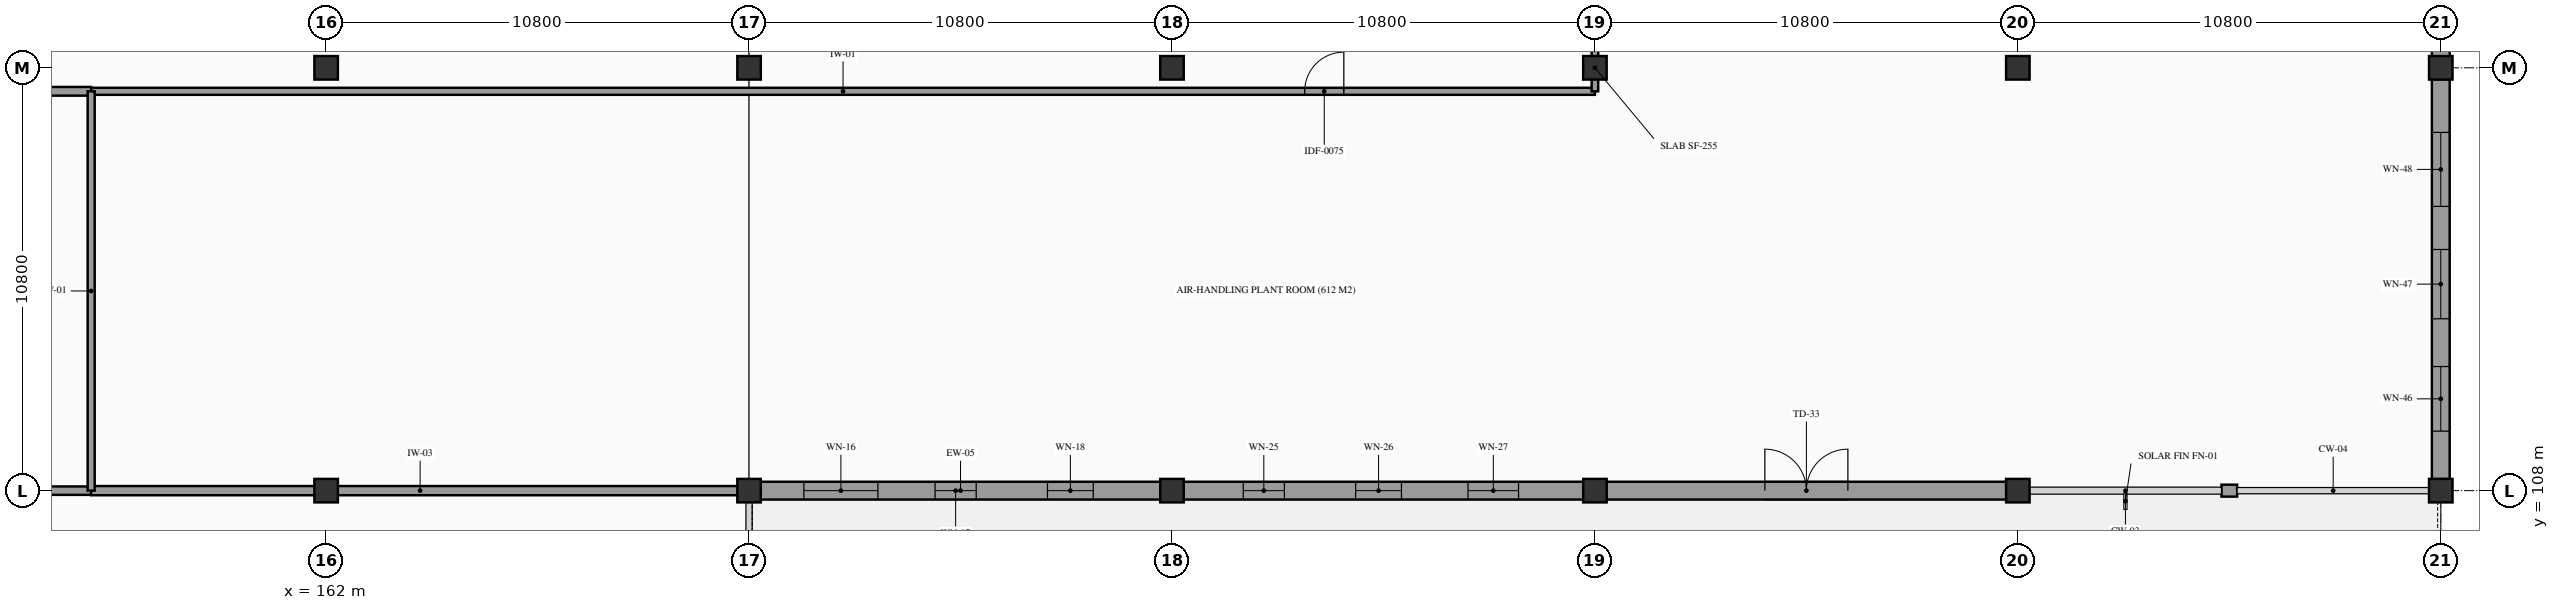
"""IFC4 building model, lengths in metres.
Left out: names, types, materials, properties, quantities, classifications, styles, units other than length and angle.
Written with IfcOpenShell. Run it as: python <this file> out.ifc"""

import sys

from ifc_helpers import new_model, si_unit, direction, frame, frame_2d, origin, origin_2d, place, context, subcontext, project, spatial, rectangle, extrude, element, fill, save


model = new_model("IFC4")
c1 = context("Model", 3, precision=1e-05, world=origin(), true_north=direction((0.0, 1.0)))
c2 = subcontext(c1, "Body", "Model", "MODEL_VIEW")
j1 = project(units=[si_unit("LENGTHUNIT", "METRE"), si_unit("PLANEANGLEUNIT", "RADIAN")], contexts=[c1])
p1 = place(None, origin())
s1 = spatial("IfcSite", under=j1, at=p1, CompositionType="ELEMENT")
p2 = place(p1, origin())
s2 = spatial("IfcBuilding", under=s1, at=p2, CompositionType="ELEMENT")
p3 = place(p2, frame((0.0, 0.0, 5.4)))
s3 = spatial("IfcBuildingStorey", under=s2, at=p3, CompositionType="ELEMENT", Elevation=5.4)
for number, where, z_axis, x_axis in (
    (1, (162.0, 108.0, 0.0), (0.0, 0.0, 1.0), (1.0, 0.0, 0.0)),
    (2, (162.0, 118.8, 0.0), (0.0, 0.0, 1.0), (1.0, 0.0, 0.0)),
    (3, (172.8, 108.0, 0.0), (0.0, 0.0, 1.0), (1.0, 0.0, 0.0)),
    (4, (172.8, 118.8, 0.0), (0.0, 0.0, 1.0), (1.0, 0.0, 0.0)),
    (5, (183.6, 108.0, 0.0), (0.0, 0.0, 1.0), (1.0, 0.0, 0.0)),
    (6, (183.6, 118.8, 0.0), (0.0, 0.0, 1.0), (1.0, 0.0, 0.0)),
    (7, (194.4, 108.0, 0.0), (0.0, 0.0, 1.0), (1.0, 0.0, 0.0)),
    (8, (194.4, 118.8, 0.0), (0.0, 0.0, 1.0), (1.0, 0.0, 0.0)),
    (9, (205.2, 108.0, 0.0), (0.0, 0.0, 1.0), (1.0, 0.0, 0.0)),
    (10, (205.2, 118.8, 0.0), (0.0, 0.0, 1.0), (1.0, 0.0, 0.0)),
    (11, (216.0, 108.0, 0.0), (0.0, 0.0, 1.0), (1.0, 0.0, 0.0)),
    (12, (216.0, 118.8, 0.0), (0.0, 0.0, 1.0), (1.0, 0.0, 0.0)),
):
    element("IfcColumn", number, at=place(p3, frame(where, z_axis=z_axis, x_axis=x_axis)), inside=s3, PredefinedType="COLUMN", context=c2, shape_type="SweptSolid", body=[
        extrude(rectangle(XDim=0.6, YDim=0.6, at=origin_2d()), origin(), (0.0, 0.0, 1.0), 4.68),
    ])
p4 = place(p3, frame((173.095, 108.0, 0.0), z_axis=(0.0, 0.0, 1.0), x_axis=(1.0, 0.0, 0.0)))
e13 = element("IfcWall", 13, at=p4, inside=s3, PredefinedType="STANDARD", context=c2, shape_type="SweptSolid", body=[
    extrude(rectangle(XDim=10.21, YDim=0.455, at=frame_2d((5.105, 0.0))), origin(), (0.0, 0.0, 1.0), 3.53),
])
p5 = place(p4, frame((1.105, 0.0, 0.95)))
e14 = element("IfcOpeningElement", 14, at=p5, cuts=e13, PredefinedType="OPENING", context=c2, shape_type="SweptSolid", body=[
    extrude(rectangle(XDim=1.89, YDim=1.05, at=frame_2d((0.945, 0.525))), frame((0.0, 0.238, 0.0), z_axis=(0.0, -1.0, 0.0), x_axis=(1.0, 0.0, 0.0)), (0.0, 0.0, 1.0), 0.475),
])
p6 = place(p4, frame((4.455, 0.0, 0.95)))
e15 = element("IfcOpeningElement", 15, at=p6, cuts=e13, PredefinedType="OPENING", context=c2, shape_type="SweptSolid", body=[
    extrude(rectangle(XDim=1.05, YDim=1.2, at=frame_2d((0.525, 0.6))), frame((0.0, 0.238, 0.0), z_axis=(0.0, -1.0, 0.0), x_axis=(1.0, 0.0, 0.0)), (0.0, 0.0, 1.0), 0.475),
])
p7 = place(p4, frame((7.325, 0.0, 0.95)))
e16 = element("IfcOpeningElement", 16, at=p7, cuts=e13, PredefinedType="OPENING", context=c2, shape_type="SweptSolid", body=[
    extrude(rectangle(XDim=1.17, YDim=1.2, at=frame_2d((0.585, 0.6))), frame((0.0, 0.238, 0.0), z_axis=(0.0, -1.0, 0.0), x_axis=(1.0, 0.0, 0.0)), (0.0, 0.0, 1.0), 0.475),
])
p8 = place(p3, frame((183.895, 108.0, 0.0), z_axis=(0.0, 0.0, 1.0), x_axis=(1.0, 0.0, 0.0)))
e17 = element("IfcWall", 17, at=p8, inside=s3, PredefinedType="STANDARD", context=c2, shape_type="SweptSolid", body=[
    extrude(rectangle(XDim=10.21, YDim=0.455, at=frame_2d((5.105, 0.0))), origin(), (0.0, 0.0, 1.0), 3.53),
])
p9 = place(p8, frame((1.525, 0.0, 0.95)))
e18 = element("IfcOpeningElement", 18, at=p9, cuts=e17, PredefinedType="OPENING", context=c2, shape_type="SweptSolid", body=[
    extrude(rectangle(XDim=1.05, YDim=1.35, at=frame_2d((0.525, 0.675))), frame((0.0, 0.238, 0.0), z_axis=(0.0, -1.0, 0.0), x_axis=(1.0, 0.0, 0.0)), (0.0, 0.0, 1.0), 0.475),
])
p10 = place(p8, frame((4.395, 0.0, 0.95)))
e19 = element("IfcOpeningElement", 19, at=p10, cuts=e17, PredefinedType="OPENING", context=c2, shape_type="SweptSolid", body=[
    extrude(rectangle(XDim=1.17, YDim=1.35, at=frame_2d((0.585, 0.675))), frame((0.0, 0.238, 0.0), z_axis=(0.0, -1.0, 0.0), x_axis=(1.0, 0.0, 0.0)), (0.0, 0.0, 1.0), 0.475),
])
p11 = place(p8, frame((7.265, 0.0, 0.95)))
e20 = element("IfcOpeningElement", 20, at=p11, cuts=e17, PredefinedType="OPENING", context=c2, shape_type="SweptSolid", body=[
    extrude(rectangle(XDim=1.29, YDim=1.35, at=frame_2d((0.645, 0.675))), frame((0.0, 0.238, 0.0), z_axis=(0.0, -1.0, 0.0), x_axis=(1.0, 0.0, 0.0)), (0.0, 0.0, 1.0), 0.475),
])
p12 = place(p3, frame((194.695, 108.0, 0.0), z_axis=(0.0, 0.0, 1.0), x_axis=(1.0, 0.0, 0.0)))
e21 = element("IfcWall", 21, at=p12, inside=s3, PredefinedType="STANDARD", context=c2, shape_type="SweptSolid", body=[
    extrude(rectangle(XDim=10.21, YDim=0.455, at=frame_2d((5.105, 0.0))), origin(), (0.0, 0.0, 1.0), 3.53),
])
p13 = place(p12, frame((4.045, 0.0, 0.0)))
e22 = element("IfcOpeningElement", 22, at=p13, cuts=e21, PredefinedType="OPENING", context=c2, shape_type="SweptSolid", body=[
    extrude(rectangle(XDim=2.12, YDim=2.26, at=frame_2d((1.06, 1.13))), frame((0.0, 0.238, 0.0), z_axis=(0.0, -1.0, 0.0), x_axis=(1.0, 0.0, 0.0)), (0.0, 0.0, 1.0), 0.475),
])
p14 = place(p3, frame((210.4, 108.0, 0.0), z_axis=(0.0, 0.0, 1.0), x_axis=(1.0, 0.0, 0.0)))
e23 = element("IfcWall", 23, at=p14, inside=s3, PredefinedType="STANDARD", context=c2, shape_type="SweptSolid", body=[
    extrude(rectangle(XDim=0.4, YDim=0.305, at=frame_2d((0.2, 0.0))), origin(), (0.0, 0.0, 1.0), 3.53),
])
p15 = place(p3, frame((216.0, 108.295, 0.0), z_axis=(0.0, 0.0, 1.0), x_axis=(0.0, 1.0, 0.0)))
e24 = element("IfcWall", 24, at=p15, inside=s3, PredefinedType="STANDARD", context=c2, shape_type="SweptSolid", body=[
    extrude(rectangle(XDim=10.21, YDim=0.455, at=frame_2d((5.105, 0.0))), origin(), (0.0, 0.0, 1.0), 3.53),
])
p16 = place(p15, frame((1.225, 0.0, 0.95)))
e25 = element("IfcOpeningElement", 25, at=p16, cuts=e24, PredefinedType="OPENING", context=c2, shape_type="SweptSolid", body=[
    extrude(rectangle(XDim=1.65, YDim=1.65, at=frame_2d((0.825, 0.825))), frame((0.0, 0.238, 0.0), z_axis=(0.0, -1.0, 0.0), x_axis=(1.0, 0.0, 0.0)), (0.0, 0.0, 1.0), 0.475),
])
p17 = place(p15, frame((4.095, 0.0, 0.95)))
e26 = element("IfcOpeningElement", 26, at=p17, cuts=e24, PredefinedType="OPENING", context=c2, shape_type="SweptSolid", body=[
    extrude(rectangle(XDim=1.77, YDim=1.65, at=frame_2d((0.885, 0.825))), frame((0.0, 0.238, 0.0), z_axis=(0.0, -1.0, 0.0), x_axis=(1.0, 0.0, 0.0)), (0.0, 0.0, 1.0), 0.475),
])
p18 = place(p15, frame((6.965, 0.0, 0.95)))
e27 = element("IfcOpeningElement", 27, at=p18, cuts=e24, PredefinedType="OPENING", context=c2, shape_type="SweptSolid", body=[
    extrude(rectangle(XDim=1.89, YDim=1.65, at=frame_2d((0.945, 0.825))), frame((0.0, 0.238, 0.0), z_axis=(0.0, -1.0, 0.0), x_axis=(1.0, 0.0, 0.0)), (0.0, 0.0, 1.0), 0.475),
])
p19 = place(p3, frame((216.0, 119.095, 0.0), z_axis=(0.0, 0.0, 1.0), x_axis=(0.0, 1.0, 0.0)))
e28 = element("IfcWall", 28, at=p19, inside=s3, PredefinedType="STANDARD", context=c2, shape_type="SweptSolid", body=[
    extrude(rectangle(XDim=10.21, YDim=0.455, at=frame_2d((5.105, 0.0))), origin(), (0.0, 0.0, 1.0), 3.53),
])
p20 = place(p19, frame((1.345, 0.0, 0.95)))
e29 = element("IfcOpeningElement", 29, at=p20, cuts=e28, PredefinedType="OPENING", context=c2, shape_type="SweptSolid", body=[
    extrude(rectangle(XDim=1.41, YDim=1.8, at=frame_2d((0.705, 0.9))), frame((0.0, 0.238, 0.0), z_axis=(0.0, -1.0, 0.0), x_axis=(1.0, 0.0, 0.0)), (0.0, 0.0, 1.0), 0.475),
])
p21 = place(p19, frame((4.215, 0.0, 0.95)))
e30 = element("IfcOpeningElement", 30, at=p21, cuts=e28, PredefinedType="OPENING", context=c2, shape_type="SweptSolid", body=[
    extrude(rectangle(XDim=1.53, YDim=1.8, at=frame_2d((0.765, 0.9))), frame((0.0, 0.238, 0.0), z_axis=(0.0, -1.0, 0.0), x_axis=(1.0, 0.0, 0.0)), (0.0, 0.0, 1.0), 0.475),
])
p22 = place(p19, frame((7.085, 0.0, 0.95)))
e31 = element("IfcOpeningElement", 31, at=p22, cuts=e28, PredefinedType="OPENING", context=c2, shape_type="SweptSolid", body=[
    extrude(rectangle(XDim=1.65, YDim=1.8, at=frame_2d((0.825, 0.9))), frame((0.0, 0.238, 0.0), z_axis=(0.0, -1.0, 0.0), x_axis=(1.0, 0.0, 0.0)), (0.0, 0.0, 1.0), 0.475),
])
p23 = place(p3, frame((118.8, 118.2, 0.0), z_axis=(0.0, 0.0, 1.0), x_axis=(1.0, 0.0, 0.0)))
e32 = element("IfcWall", 32, at=p23, inside=s3, PredefinedType="PARTITIONING", context=c2, shape_type="SweptSolid", body=[
    extrude(rectangle(XDim=37.2, YDim=0.222, at=frame_2d((18.6, 0.0))), origin(), (0.0, 0.0, 1.0), 3.23),
])
p24 = place(p23, frame((3.354, 0.0, 0.0)))
e33 = element("IfcOpeningElement", 33, at=p24, cuts=e32, PredefinedType="OPENING", context=c2, shape_type="SweptSolid", body=[
    extrude(rectangle(XDim=2.22, YDim=2.6, at=frame_2d((1.11, 1.3))), frame((0.0, 0.121, 0.0), z_axis=(0.0, -1.0, 0.0), x_axis=(1.0, 0.0, 0.0)), (0.0, 0.0, 1.0), 0.242),
])
p25 = place(p3, frame((156.0, 118.2, 0.0), z_axis=(0.0, 0.0, 1.0), x_axis=(1.0, 0.0, 0.0)))
e34 = element("IfcWall", 34, at=p25, inside=s3, PredefinedType="PARTITIONING", context=c2, shape_type="SweptSolid", body=[
    extrude(rectangle(XDim=38.4, YDim=0.18, at=frame_2d((19.2, 0.0))), origin(), (0.0, 0.0, 1.0), 3.23),
])
p26 = place(p25, frame((30.988, 0.0, 0.0)))
e35 = element("IfcOpeningElement", 35, at=p26, cuts=e34, PredefinedType="OPENING", context=c2, shape_type="SweptSolid", body=[
    extrude(rectangle(XDim=1.0, YDim=2.15, at=frame_2d((0.5, 1.075))), frame((0.0, 0.1, 0.0), z_axis=(0.0, -1.0, 0.0), x_axis=(1.0, 0.0, 0.0)), (0.0, 0.0, 1.0), 0.2),
])
p27 = place(p3, frame((151.2, 108.0, 0.0), z_axis=(0.0, 0.0, 1.0), x_axis=(1.0, 0.0, 0.0)))
e36 = element("IfcWall", 36, at=p27, inside=s3, PredefinedType="PARTITIONING", context=c2, shape_type="SweptSolid", body=[
    extrude(rectangle(XDim=4.8, YDim=0.215, at=frame_2d((2.4, 0.0))), origin(), (0.0, 0.0, 1.0), 3.23),
])
p28 = place(p3, frame((156.0, 108.0, 0.0), z_axis=(0.0, 0.0, 1.0), x_axis=(1.0, 0.0, 0.0)))
e37 = element("IfcWall", 37, at=p28, inside=s3, PredefinedType="PARTITIONING", context=c2, shape_type="SweptSolid", body=[
    extrude(rectangle(XDim=16.8, YDim=0.235, at=frame_2d((8.4, 0.0))), origin(), (0.0, 0.0, 1.0), 3.23),
])
p29 = place(p3, frame((156.0, 108.0, 0.0), z_axis=(0.0, 0.0, 1.0), x_axis=(0.0, 1.0, 0.0)))
e38 = element("IfcWall", 38, at=p29, inside=s3, PredefinedType="PARTITIONING", context=c2, shape_type="SweptSolid", body=[
    extrude(rectangle(XDim=10.2, YDim=0.18, at=frame_2d((5.1, 0.0))), origin(), (0.0, 0.0, 1.0), 3.23),
])
p30 = place(p3, frame((194.4, 118.2, 0.0), z_axis=(0.0, 0.0, 1.0), x_axis=(0.0, 1.0, 0.0)))
e39 = element("IfcWall", 39, at=p30, inside=s3, PredefinedType="PARTITIONING", context=c2, shape_type="SweptSolid", body=[
    extrude(rectangle(XDim=3.6, YDim=0.168, at=frame_2d((1.8, 0.0))), origin(), (0.0, 0.0, 1.0), 3.23),
])
p31 = place(p5, frame((1.89, 0.0, 0.0), z_axis=(0.0, 0.0, 1.0), x_axis=(-1.0, 0.0, 0.0)))
e40 = element("IfcWindow", 40, at=p31, inside=s3, PartitioningType="SINGLE_PANEL", PredefinedType="WINDOW", context=c2, shape_type="SweptSolid", body=[
    extrude(rectangle(XDim=1.89, YDim=1.05, at=frame_2d((0.945, 0.525))), frame((0.0, 0.03, 0.0), z_axis=(0.0, -1.0, 0.0), x_axis=(1.0, 0.0, 0.0)), (0.0, 0.0, 1.0), 0.06),
])
fill(e14, e40)
p32 = place(p6, frame((1.05, 0.0, 0.0), z_axis=(0.0, 0.0, 1.0), x_axis=(-1.0, 0.0, 0.0)))
e41 = element("IfcWindow", 41, at=p32, inside=s3, PartitioningType="SINGLE_PANEL", PredefinedType="WINDOW", context=c2, shape_type="SweptSolid", body=[
    extrude(rectangle(XDim=1.05, YDim=1.2, at=frame_2d((0.525, 0.6))), frame((0.0, 0.03, 0.0), z_axis=(0.0, -1.0, 0.0), x_axis=(1.0, 0.0, 0.0)), (0.0, 0.0, 1.0), 0.06),
])
fill(e15, e41)
p33 = place(p7, frame((1.17, 0.0, 0.0), z_axis=(0.0, 0.0, 1.0), x_axis=(-1.0, 0.0, 0.0)))
e42 = element("IfcWindow", 42, at=p33, inside=s3, PartitioningType="SINGLE_PANEL", PredefinedType="WINDOW", context=c2, shape_type="SweptSolid", body=[
    extrude(rectangle(XDim=1.17, YDim=1.2, at=frame_2d((0.585, 0.6))), frame((0.0, 0.03, 0.0), z_axis=(0.0, -1.0, 0.0), x_axis=(1.0, 0.0, 0.0)), (0.0, 0.0, 1.0), 0.06),
])
fill(e16, e42)
p34 = place(p9, frame((1.05, 0.0, 0.0), z_axis=(0.0, 0.0, 1.0), x_axis=(-1.0, 0.0, 0.0)))
e43 = element("IfcWindow", 43, at=p34, inside=s3, PartitioningType="SINGLE_PANEL", PredefinedType="WINDOW", context=c2, shape_type="SweptSolid", body=[
    extrude(rectangle(XDim=1.05, YDim=1.35, at=frame_2d((0.525, 0.675))), frame((0.0, 0.03, 0.0), z_axis=(0.0, -1.0, 0.0), x_axis=(1.0, 0.0, 0.0)), (0.0, 0.0, 1.0), 0.06),
])
fill(e18, e43)
p35 = place(p10, frame((1.17, 0.0, 0.0), z_axis=(0.0, 0.0, 1.0), x_axis=(-1.0, 0.0, 0.0)))
e44 = element("IfcWindow", 44, at=p35, inside=s3, PartitioningType="SINGLE_PANEL", PredefinedType="WINDOW", context=c2, shape_type="SweptSolid", body=[
    extrude(rectangle(XDim=1.17, YDim=1.35, at=frame_2d((0.585, 0.675))), frame((0.0, 0.03, 0.0), z_axis=(0.0, -1.0, 0.0), x_axis=(1.0, 0.0, 0.0)), (0.0, 0.0, 1.0), 0.06),
])
fill(e19, e44)
p36 = place(p11, frame((1.29, 0.0, 0.0), z_axis=(0.0, 0.0, 1.0), x_axis=(-1.0, 0.0, 0.0)))
e45 = element("IfcWindow", 45, at=p36, inside=s3, PartitioningType="SINGLE_PANEL", PredefinedType="WINDOW", context=c2, shape_type="SweptSolid", body=[
    extrude(rectangle(XDim=1.29, YDim=1.35, at=frame_2d((0.645, 0.675))), frame((0.0, 0.03, 0.0), z_axis=(0.0, -1.0, 0.0), x_axis=(1.0, 0.0, 0.0)), (0.0, 0.0, 1.0), 0.06),
])
fill(e20, e45)
p37 = place(p13, frame((2.12, 0.0, 0.0), z_axis=(0.0, 0.0, 1.0), x_axis=(-1.0, 0.0, 0.0)))
e46 = element("IfcDoor", 46, at=p37, inside=s3, OperationType="DOUBLE_DOOR_SINGLE_SWING", PredefinedType="DOOR", context=c2, shape_type="SweptSolid", body=[
    extrude(rectangle(XDim=2.12, YDim=2.26, at=frame_2d((1.06, 1.13))), frame((0.0, 0.025, 0.0), z_axis=(0.0, -1.0, 0.0), x_axis=(1.0, 0.0, 0.0)), (0.0, 0.0, 1.0), 0.05),
])
fill(e22, e46)
p38 = place(p16, frame((1.65, 0.0, 0.0), z_axis=(0.0, 0.0, 1.0), x_axis=(-1.0, 0.0, 0.0)))
e47 = element("IfcWindow", 47, at=p38, inside=s3, PartitioningType="SINGLE_PANEL", PredefinedType="WINDOW", context=c2, shape_type="SweptSolid", body=[
    extrude(rectangle(XDim=1.65, YDim=1.65, at=frame_2d((0.825, 0.825))), frame((0.0, 0.03, 0.0), z_axis=(0.0, -1.0, 0.0), x_axis=(1.0, 0.0, 0.0)), (0.0, 0.0, 1.0), 0.06),
])
fill(e25, e47)
p39 = place(p17, frame((1.77, 0.0, 0.0), z_axis=(0.0, 0.0, 1.0), x_axis=(-1.0, 0.0, 0.0)))
e48 = element("IfcWindow", 48, at=p39, inside=s3, PartitioningType="SINGLE_PANEL", PredefinedType="WINDOW", context=c2, shape_type="SweptSolid", body=[
    extrude(rectangle(XDim=1.77, YDim=1.65, at=frame_2d((0.885, 0.825))), frame((0.0, 0.03, 0.0), z_axis=(0.0, -1.0, 0.0), x_axis=(1.0, 0.0, 0.0)), (0.0, 0.0, 1.0), 0.06),
])
fill(e26, e48)
p40 = place(p18, frame((1.89, 0.0, 0.0), z_axis=(0.0, 0.0, 1.0), x_axis=(-1.0, 0.0, 0.0)))
e49 = element("IfcWindow", 49, at=p40, inside=s3, PartitioningType="SINGLE_PANEL", PredefinedType="WINDOW", context=c2, shape_type="SweptSolid", body=[
    extrude(rectangle(XDim=1.89, YDim=1.65, at=frame_2d((0.945, 0.825))), frame((0.0, 0.03, 0.0), z_axis=(0.0, -1.0, 0.0), x_axis=(1.0, 0.0, 0.0)), (0.0, 0.0, 1.0), 0.06),
])
fill(e27, e49)
p41 = place(p26, frame((1.0, 0.0, 0.0), z_axis=(0.0, 0.0, 1.0), x_axis=(-1.0, 0.0, 0.0)))
e50 = element("IfcDoor", 50, at=p41, inside=s3, OperationType="SINGLE_SWING_RIGHT", PredefinedType="DOOR", context=c2, shape_type="SweptSolid", body=[
    extrude(rectangle(XDim=1.0, YDim=2.15, at=frame_2d((0.5, 1.075))), frame((0.0, 0.025, 0.0), z_axis=(0.0, -1.0, 0.0), x_axis=(1.0, 0.0, 0.0)), (0.0, 0.0, 1.0), 0.05),
])
fill(e35, e50)
save(model, sys.argv[1])
